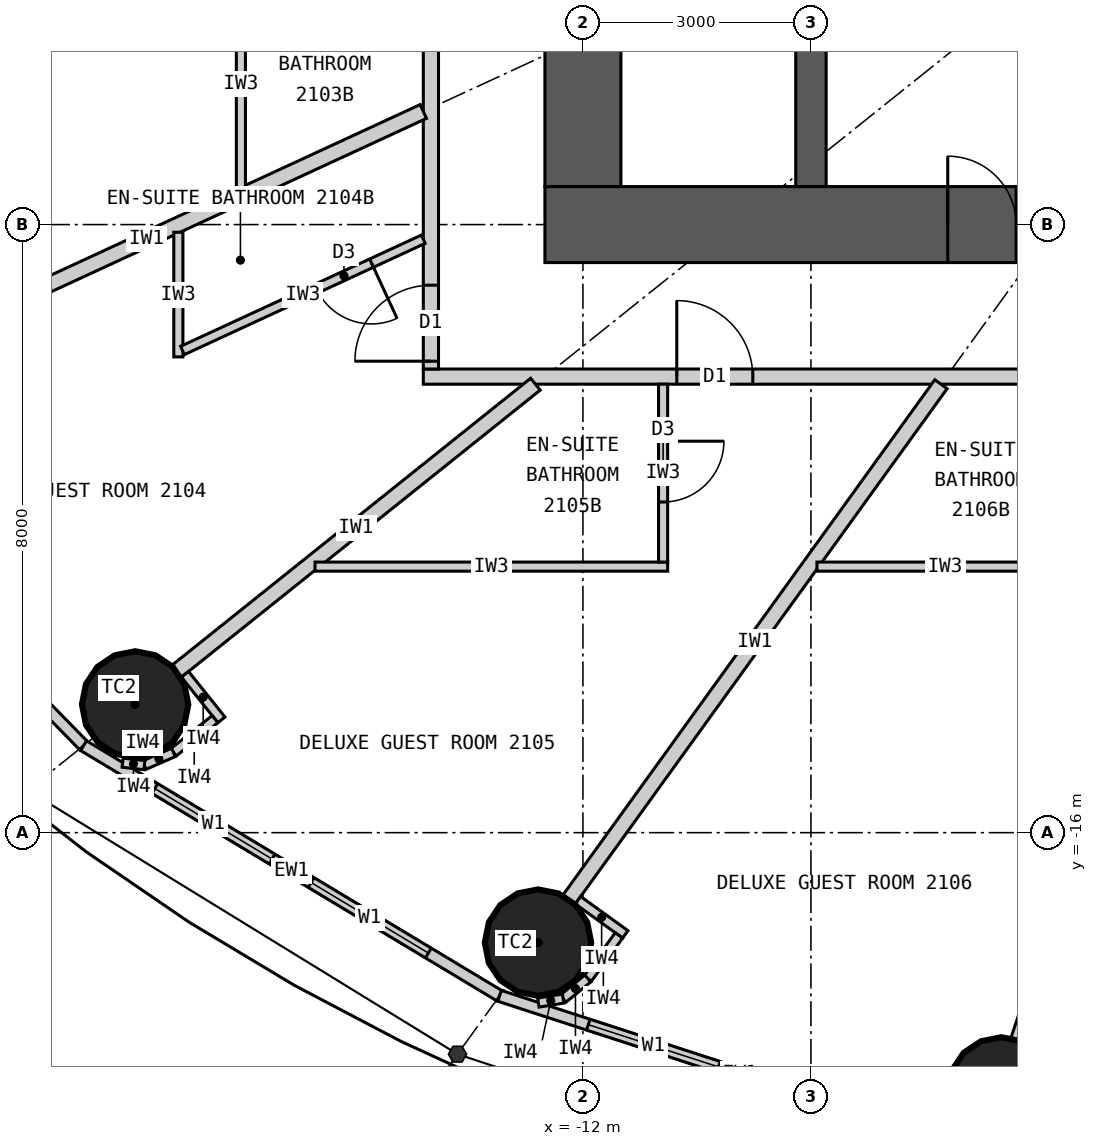
"""IFC4 building model, lengths in metres.
Left out: names, types, materials, properties, quantities, classifications, styles, units other than length and angle.
Written with IfcOpenShell. Run it as: python <this file> out.ifc"""

import sys

from ifc_helpers import new_model, si_unit, direction, frame, frame_2d, origin, origin_2d, place, context, subcontext, project, spatial, rectangle, circle, extrude, element, fill, save


model = new_model("IFC4")
c1 = context("Model", 3, precision=1e-05, world=origin(), true_north=direction((0.0, 1.0)))
c2 = subcontext(c1, "Body", "Model", "MODEL_VIEW")
j1 = project(units=[si_unit("LENGTHUNIT", "METRE"), si_unit("PLANEANGLEUNIT", "RADIAN")], contexts=[c1])
p1 = place(None, origin())
s1 = spatial("IfcSite", under=j1, at=p1, CompositionType="ELEMENT")
p2 = place(p1, origin())
s2 = spatial("IfcBuilding", under=s1, at=p2, CompositionType="ELEMENT")
p3 = place(p2, frame((0.0, 0.0, 83.7)))
s3 = spatial("IfcBuildingStorey", under=s2, at=p3, CompositionType="ELEMENT", Elevation=83.7)
for number, where, z_axis, x_axis in (
    (1, (-17.892, -14.313, 0.0), (0.0, 0.0, 1.0), (1.0, 0.0, 0.0)),
    (2, (-12.591, -17.447, 0.0), (0.0, 0.0, 1.0), (1.0, 0.0, 0.0)),
    (3, (-6.495, -19.391, 0.0), (0.0, 0.0, 1.0), (1.0, 0.0, 0.0)),
):
    element("IfcColumn", number, at=place(p3, frame(where, z_axis=z_axis, x_axis=x_axis)), inside=s3, PredefinedType="COLUMN", context=c2, shape_type="SweptSolid", body=[
        extrude(circle(Radius=0.7, at=origin_2d()), origin(), (0.0, 0.0, 1.0), 3.3),
    ])
p4 = place(p3, frame((12.5, -8.0, 0.0), z_axis=(0.0, 0.0, 1.0), x_axis=(-1.0, 0.0, 0.0)))
e4 = element("IfcWall", 4, at=p4, inside=s3, PredefinedType="SHEAR", context=c2, shape_type="SweptSolid", body=[
    extrude(rectangle(XDim=25.0, YDim=1.0, at=frame_2d((12.5, 0.0))), origin(), (0.0, 0.0, 1.0), 3.3),
])
p5 = place(p4, frame((11.2, 0.0, 0.0)))
e5 = element("IfcOpeningElement", 5, at=p5, cuts=e4, PredefinedType="OPENING", context=c2, shape_type="SweptSolid", body=[
    extrude(rectangle(XDim=1.2, YDim=2.2, at=frame_2d((0.6, 1.1))), frame((0.0, 0.51, 0.0), z_axis=(0.0, -1.0, 0.0), x_axis=(1.0, 0.0, 0.0)), (0.0, 0.0, 1.0), 1.02),
])
p6 = place(p4, frame((18.8, 0.0, 0.0)))
e6 = element("IfcOpeningElement", 6, at=p6, cuts=e4, PredefinedType="OPENING", context=c2, shape_type="SweptSolid", body=[
    extrude(rectangle(XDim=0.9, YDim=2.2, at=frame_2d((0.45, 1.1))), frame((0.0, 0.51, 0.0), z_axis=(0.0, -1.0, 0.0), x_axis=(1.0, 0.0, 0.0)), (0.0, 0.0, 1.0), 1.02),
])
p7 = place(p3, frame((-12.0, 7.5, 0.0), z_axis=(0.0, 0.0, 1.0), x_axis=(0.0, -1.0, 0.0)))
e7 = element("IfcWall", 7, at=p7, inside=s3, PredefinedType="SHEAR", context=c2, shape_type="SweptSolid", body=[
    extrude(rectangle(XDim=15.0, YDim=1.0, at=frame_2d((7.5, 0.0))), origin(), (0.0, 0.0, 1.0), 3.3),
])
p8 = place(p7, frame((6.6, 0.0, 0.0)))
e8 = element("IfcOpeningElement", 8, at=p8, cuts=e7, PredefinedType="OPENING", context=c2, shape_type="SweptSolid", body=[
    extrude(rectangle(XDim=1.8, YDim=2.2, at=frame_2d((0.9, 1.1))), frame((0.0, 0.51, 0.0), z_axis=(0.0, -1.0, 0.0), x_axis=(1.0, 0.0, 0.0)), (0.0, 0.0, 1.0), 1.02),
])
p9 = place(p3, frame((-9.0, -7.5, 0.0), z_axis=(0.0, 0.0, 1.0), x_axis=(0.0, 1.0, 0.0)))
e9 = element("IfcWall", 9, at=p9, inside=s3, PredefinedType="SHEAR", context=c2, shape_type="SweptSolid", body=[
    extrude(rectangle(XDim=3.0, YDim=0.4, at=frame_2d((1.5, 0.0))), origin(), (0.0, 0.0, 1.0), 3.3),
])
p10 = place(p3, frame((-22.803, -10.532, 0.0), z_axis=(0.0, 0.0, 1.0), x_axis=(0.699602905915, -0.714531856557, 0.0)))
e10 = element("IfcWall", 10, at=p10, inside=s3, PredefinedType="ELEMENTEDWALL", context=c2, shape_type="SweptSolid", body=[
    extrude(rectangle(XDim=6.051, YDim=0.15, at=frame_2d((3.025, 0.0))), origin(), (0.0, 0.0, 1.0), 3.12),
])
p11 = place(p10, frame((0.926, 0.0, 0.9)))
e11 = element("IfcOpeningElement", 11, at=p11, cuts=e10, PredefinedType="OPENING", context=c2, shape_type="SweptSolid", body=[
    extrude(rectangle(XDim=1.8, YDim=1.9, at=frame_2d((0.9, 0.95))), frame((0.0, 0.085, 0.0), z_axis=(0.0, -1.0, 0.0), x_axis=(1.0, 0.0, 0.0)), (0.0, 0.0, 1.0), 0.17),
])
p12 = place(p10, frame((3.325, 0.0, 0.9)))
e12 = element("IfcOpeningElement", 12, at=p12, cuts=e10, PredefinedType="OPENING", context=c2, shape_type="SweptSolid", body=[
    extrude(rectangle(XDim=1.8, YDim=1.9, at=frame_2d((0.9, 0.95))), frame((0.0, 0.085, 0.0), z_axis=(0.0, -1.0, 0.0), x_axis=(1.0, 0.0, 0.0)), (0.0, 0.0, 1.0), 0.17),
])
p13 = place(p3, frame((-18.57, -14.856, 0.0), z_axis=(0.0, 0.0, 1.0), x_axis=(0.856983180864, -0.515344377787, 0.0)))
e13 = element("IfcWall", 13, at=p13, inside=s3, PredefinedType="ELEMENTEDWALL", context=c2, shape_type="SweptSolid", body=[
    extrude(rectangle(XDim=6.386, YDim=0.15, at=frame_2d((3.193, 0.0))), origin(), (0.0, 0.0, 1.0), 3.12),
])
p14 = place(p13, frame((1.093, 0.0, 0.9)))
e14 = element("IfcOpeningElement", 14, at=p14, cuts=e13, PredefinedType="OPENING", context=c2, shape_type="SweptSolid", body=[
    extrude(rectangle(XDim=1.8, YDim=1.9, at=frame_2d((0.9, 0.95))), frame((0.0, 0.085, 0.0), z_axis=(0.0, -1.0, 0.0), x_axis=(1.0, 0.0, 0.0)), (0.0, 0.0, 1.0), 0.17),
])
p15 = place(p13, frame((3.493, 0.0, 0.9)))
e15 = element("IfcOpeningElement", 15, at=p15, cuts=e13, PredefinedType="OPENING", context=c2, shape_type="SweptSolid", body=[
    extrude(rectangle(XDim=1.8, YDim=1.9, at=frame_2d((0.9, 0.95))), frame((0.0, 0.085, 0.0), z_axis=(0.0, -1.0, 0.0), x_axis=(1.0, 0.0, 0.0)), (0.0, 0.0, 1.0), 0.17),
])
p16 = place(p3, frame((-13.096, -18.147, 0.0), z_axis=(0.0, 0.0, 1.0), x_axis=(0.951137534625, -0.308767534285, 0.0)))
e16 = element("IfcWall", 16, at=p16, inside=s3, PredefinedType="ELEMENTEDWALL", context=c2, shape_type="SweptSolid", body=[
    extrude(rectangle(XDim=6.655, YDim=0.15, at=frame_2d((3.328, 0.0))), origin(), (0.0, 0.0, 1.0), 3.12),
])
p17 = place(p16, frame((1.228, 0.0, 0.9)))
e17 = element("IfcOpeningElement", 17, at=p17, cuts=e16, PredefinedType="OPENING", context=c2, shape_type="SweptSolid", body=[
    extrude(rectangle(XDim=1.8, YDim=1.9, at=frame_2d((0.9, 0.95))), frame((0.0, 0.085, 0.0), z_axis=(0.0, -1.0, 0.0), x_axis=(1.0, 0.0, 0.0)), (0.0, 0.0, 1.0), 0.17),
])
p18 = place(p16, frame((3.628, 0.0, 0.9)))
e18 = element("IfcOpeningElement", 18, at=p18, cuts=e16, PredefinedType="OPENING", context=c2, shape_type="SweptSolid", body=[
    extrude(rectangle(XDim=1.8, YDim=1.9, at=frame_2d((0.9, 0.95))), frame((0.0, 0.085, 0.0), z_axis=(0.0, -1.0, 0.0), x_axis=(1.0, 0.0, 0.0)), (0.0, 0.0, 1.0), 0.17),
])
p19 = place(p3, frame((14.1, -10.0, 0.0), z_axis=(0.0, 0.0, 1.0), x_axis=(-1.0, 0.0, 0.0)))
e19 = element("IfcWall", 19, at=p19, inside=s3, PredefinedType="PARTITIONING", context=c2, shape_type="SweptSolid", body=[
    extrude(rectangle(XDim=28.2, YDim=0.2, at=frame_2d((14.1, 0.0))), origin(), (0.0, 0.0, 1.0), 3.12),
])
p20 = place(p19, frame((23.865, 0.0, 0.0)))
e20 = element("IfcOpeningElement", 20, at=p20, cuts=e19, PredefinedType="OPENING", context=c2, shape_type="SweptSolid", body=[
    extrude(rectangle(XDim=1.0, YDim=2.2, at=frame_2d((0.5, 1.1))), frame((0.0, 0.11, 0.0), z_axis=(0.0, -1.0, 0.0), x_axis=(1.0, 0.0, 0.0)), (0.0, 0.0, 1.0), 0.22),
])
p21 = place(p19, frame((18.529, 0.0, 0.0)))
e21 = element("IfcOpeningElement", 21, at=p21, cuts=e19, PredefinedType="OPENING", context=c2, shape_type="SweptSolid", body=[
    extrude(rectangle(XDim=1.0, YDim=2.2, at=frame_2d((0.5, 1.1))), frame((0.0, 0.11, 0.0), z_axis=(0.0, -1.0, 0.0), x_axis=(1.0, 0.0, 0.0)), (0.0, 0.0, 1.0), 0.22),
])
p22 = place(p19, frame((14.923, 0.0, 0.0)))
e22 = element("IfcOpeningElement", 22, at=p22, cuts=e19, PredefinedType="OPENING", context=c2, shape_type="SweptSolid", body=[
    extrude(rectangle(XDim=1.0, YDim=2.2, at=frame_2d((0.5, 1.1))), frame((0.0, 0.11, 0.0), z_axis=(0.0, -1.0, 0.0), x_axis=(1.0, 0.0, 0.0)), (0.0, 0.0, 1.0), 0.22),
])
p23 = place(p19, frame((2.801, 0.0, 0.0)))
e23 = element("IfcOpeningElement", 23, at=p23, cuts=e19, PredefinedType="OPENING", context=c2, shape_type="SweptSolid", body=[
    extrude(rectangle(XDim=1.0, YDim=2.2, at=frame_2d((0.5, 1.1))), frame((0.0, 0.11, 0.0), z_axis=(0.0, -1.0, 0.0), x_axis=(1.0, 0.0, 0.0)), (0.0, 0.0, 1.0), 0.22),
])
p24 = place(p3, frame((-14.0, 9.9, 0.0), z_axis=(0.0, 0.0, 1.0), x_axis=(0.0, -1.0, 0.0)))
e24 = element("IfcWall", 24, at=p24, inside=s3, PredefinedType="PARTITIONING", context=c2, shape_type="SweptSolid", body=[
    extrude(rectangle(XDim=19.8, YDim=0.2, at=frame_2d((9.9, 0.0))), origin(), (0.0, 0.0, 1.0), 3.12),
])
p25 = place(p24, frame((7.097, 0.0, 0.0)))
e25 = element("IfcOpeningElement", 25, at=p25, cuts=e24, PredefinedType="OPENING", context=c2, shape_type="SweptSolid", body=[
    extrude(rectangle(XDim=1.0, YDim=2.2, at=frame_2d((0.5, 1.1))), frame((0.0, 0.11, 0.0), z_axis=(0.0, -1.0, 0.0), x_axis=(1.0, 0.0, 0.0)), (0.0, 0.0, 1.0), 0.22),
])
p26 = place(p24, frame((10.778, 0.0, 0.0)))
e26 = element("IfcOpeningElement", 26, at=p26, cuts=e24, PredefinedType="OPENING", context=c2, shape_type="SweptSolid", body=[
    extrude(rectangle(XDim=1.0, YDim=2.2, at=frame_2d((0.5, 1.1))), frame((0.0, 0.11, 0.0), z_axis=(0.0, -1.0, 0.0), x_axis=(1.0, 0.0, 0.0)), (0.0, 0.0, 1.0), 0.22),
])
p27 = place(p24, frame((13.552, 0.0, 0.0)))
e27 = element("IfcOpeningElement", 27, at=p27, cuts=e24, PredefinedType="OPENING", context=c2, shape_type="SweptSolid", body=[
    extrude(rectangle(XDim=1.0, YDim=2.2, at=frame_2d((0.5, 1.1))), frame((0.0, 0.11, 0.0), z_axis=(0.0, -1.0, 0.0), x_axis=(1.0, 0.0, 0.0)), (0.0, 0.0, 1.0), 0.22),
])
p28 = place(p24, frame((18.698, 0.0, 0.0)))
e28 = element("IfcOpeningElement", 28, at=p28, cuts=e24, PredefinedType="OPENING", context=c2, shape_type="SweptSolid", body=[
    extrude(rectangle(XDim=1.0, YDim=2.2, at=frame_2d((0.5, 1.1))), frame((0.0, 0.11, 0.0), z_axis=(0.0, -1.0, 0.0), x_axis=(1.0, 0.0, 0.0)), (0.0, 0.0, 1.0), 0.22),
])
p29 = place(p24, frame((1.877, 0.0, 0.0)))
e29 = element("IfcOpeningElement", 29, at=p29, cuts=e24, PredefinedType="OPENING", context=c2, shape_type="SweptSolid", body=[
    extrude(rectangle(XDim=1.0, YDim=2.2, at=frame_2d((0.5, 1.1))), frame((0.0, 0.11, 0.0), z_axis=(0.0, -1.0, 0.0), x_axis=(1.0, 0.0, 0.0)), (0.0, 0.0, 1.0), 0.22),
])
p30 = place(p3, frame((-14.1, -6.512, 0.0), z_axis=(0.0, 0.0, 1.0), x_axis=(-0.907832871056, -0.419332181247, 0.0)))
e30 = element("IfcWall", 30, at=p30, inside=s3, PredefinedType="PARTITIONING", context=c2, shape_type="SweptSolid", body=[
    extrude(rectangle(XDim=8.023, YDim=0.2, at=frame_2d((4.011, 0.0))), origin(), (0.0, 0.0, 1.0), 2.32),
])
p31 = place(p3, frame((-12.625, -10.1, 0.0), z_axis=(0.0, 0.0, 1.0), x_axis=(-0.780892451574, -0.624665493744, 0.0)))
e31 = element("IfcWall", 31, at=p31, inside=s3, PredefinedType="PARTITIONING", context=c2, shape_type="SweptSolid", body=[
    extrude(rectangle(XDim=6.045, YDim=0.2, at=frame_2d((3.022, 0.0))), origin(), (0.0, 0.0, 1.0), 2.32),
])
p32 = place(p3, frame((-7.289, -10.1, 0.0), z_axis=(0.0, 0.0, 1.0), x_axis=(-0.585198353053, -0.810890182197, 0.0)))
e32 = element("IfcWall", 32, at=p32, inside=s3, PredefinedType="PARTITIONING", context=c2, shape_type="SweptSolid", body=[
    extrude(rectangle(XDim=8.36, YDim=0.2, at=frame_2d((4.18, 0.0))), origin(), (0.0, 0.0, 1.0), 2.32),
])
p33 = place(p3, frame((-3.383, -10.1, 0.0), z_axis=(0.0, 0.0, 1.0), x_axis=(-0.31759592231, -0.948226149256, 0.0)))
e33 = element("IfcWall", 33, at=p33, inside=s3, PredefinedType="PARTITIONING", context=c2, shape_type="SweptSolid", body=[
    extrude(rectangle(XDim=9.098, YDim=0.2, at=frame_2d((4.549, 0.0))), origin(), (0.0, 0.0, 1.0), 2.32),
])
p34 = place(p3, frame((-16.5, -7.521, 0.0), z_axis=(0.0, 0.0, 1.0), x_axis=(0.0, 1.0, 0.0)))
e34 = element("IfcWall", 34, at=p34, inside=s3, PredefinedType="PARTITIONING", context=c2, shape_type="SweptSolid", body=[
    extrude(rectangle(XDim=2.749, YDim=0.12, at=frame_2d((1.374, 0.0))), origin(), (0.0, 0.0, 1.0), 3.12),
])
p35 = place(p3, frame((-17.323, -8.101, 0.0), z_axis=(0.0, 0.0, 1.0), x_axis=(0.0, -1.0, 0.0)))
e35 = element("IfcWall", 35, at=p35, inside=s3, PredefinedType="PARTITIONING", context=c2, shape_type="SweptSolid", body=[
    extrude(rectangle(XDim=1.64, YDim=0.12, at=frame_2d((0.82, 0.0))), origin(), (0.0, 0.0, 1.0), 3.12),
])
p36 = place(p3, frame((-14.1, -8.193, 0.0), z_axis=(0.0, 0.0, 1.0), x_axis=(-0.907836493557, -0.419324338628, 0.0)))
e36 = element("IfcWall", 36, at=p36, inside=s3, PredefinedType="PARTITIONING", context=c2, shape_type="SweptSolid", body=[
    extrude(rectangle(XDim=3.49, YDim=0.12, at=frame_2d((1.745, 0.0))), origin(), (0.0, 0.0, 1.0), 3.12),
])
p37 = place(p36, frame((0.75, 0.0, 0.0)))
e37 = element("IfcOpeningElement", 37, at=p37, cuts=e36, PredefinedType="OPENING", context=c2, shape_type="SweptSolid", body=[
    extrude(rectangle(XDim=0.8, YDim=2.1, at=frame_2d((0.4, 1.05))), frame((0.0, 0.07, 0.0), z_axis=(0.0, -1.0, 0.0), x_axis=(1.0, 0.0, 0.0)), (0.0, 0.0, 1.0), 0.14),
])
p38 = place(p3, frame((-15.525, -12.5, 0.0), z_axis=(0.0, 0.0, 1.0), x_axis=(1.0, 0.0, 0.0)))
e38 = element("IfcWall", 38, at=p38, inside=s3, PredefinedType="PARTITIONING", context=c2, shape_type="SweptSolid", body=[
    extrude(rectangle(XDim=4.64, YDim=0.12, at=frame_2d((2.32, 0.0))), origin(), (0.0, 0.0, 1.0), 3.12),
])
p39 = place(p3, frame((-10.945, -10.1, 0.0), z_axis=(0.0, 0.0, 1.0), x_axis=(0.0, -1.0, 0.0)))
e39 = element("IfcWall", 39, at=p39, inside=s3, PredefinedType="PARTITIONING", context=c2, shape_type="SweptSolid", body=[
    extrude(rectangle(XDim=2.34, YDim=0.12, at=frame_2d((1.17, 0.0))), origin(), (0.0, 0.0, 1.0), 3.12),
])
p40 = place(p39, frame((0.75, 0.0, 0.0)))
e40 = element("IfcOpeningElement", 40, at=p40, cuts=e39, PredefinedType="OPENING", context=c2, shape_type="SweptSolid", body=[
    extrude(rectangle(XDim=0.8, YDim=2.1, at=frame_2d((0.4, 1.05))), frame((0.0, 0.07, 0.0), z_axis=(0.0, -1.0, 0.0), x_axis=(1.0, 0.0, 0.0)), (0.0, 0.0, 1.0), 0.14),
])
p41 = place(p3, frame((-8.921, -12.5, 0.0), z_axis=(0.0, 0.0, 1.0), x_axis=(1.0, 0.0, 0.0)))
e41 = element("IfcWall", 41, at=p41, inside=s3, PredefinedType="PARTITIONING", context=c2, shape_type="SweptSolid", body=[
    extrude(rectangle(XDim=3.372, YDim=0.12, at=frame_2d((1.686, 0.0))), origin(), (0.0, 0.0, 1.0), 3.12),
])
p42 = place(p3, frame((-17.236, -13.917, 0.0), z_axis=(0.0, 0.0, 1.0), x_axis=(0.624695047554, -0.780868809443, 0.0)))
e42 = element("IfcWall", 42, at=p42, inside=s3, PredefinedType="PARTITIONING", context=c2, shape_type="SweptSolid", body=[
    extrude(rectangle(XDim=0.768, YDim=0.12, at=frame_2d((0.384, 0.0))), origin(), (0.0, 0.0, 1.0), 3.12),
])
p43 = place(p3, frame((-16.841, -14.507, 0.0), z_axis=(0.0, 0.0, 1.0), x_axis=(-0.780902834923, -0.62465251333, 0.0)))
e43 = element("IfcWall", 43, at=p43, inside=s3, PredefinedType="PARTITIONING", context=c2, shape_type="SweptSolid", body=[
    extrude(rectangle(XDim=0.7, YDim=0.12, at=frame_2d((0.35, 0.0))), origin(), (0.0, 0.0, 1.0), 3.12),
])
p44 = place(p3, frame((-17.387, -14.944, 0.0), z_axis=(0.0, 0.0, 1.0), x_axis=(-0.916036698064, -0.401094462441, 0.0)))
e44 = element("IfcWall", 44, at=p44, inside=s3, PredefinedType="PARTITIONING", context=c2, shape_type="SweptSolid", body=[
    extrude(rectangle(XDim=0.418, YDim=0.12, at=frame_2d((0.209, 0.0))), origin(), (0.0, 0.0, 1.0), 3.12),
])
p45 = place(p3, frame((-17.77, -15.112, 0.0), z_axis=(0.0, 0.0, 1.0), x_axis=(-0.993904401174, 0.110245368731, 0.0)))
e45 = element("IfcWall", 45, at=p45, inside=s3, PredefinedType="PARTITIONING", context=c2, shape_type="SweptSolid", body=[
    extrude(rectangle(XDim=0.288, YDim=0.12, at=frame_2d((0.144, 0.0))), origin(), (0.0, 0.0, 1.0), 3.12),
])
p46 = place(p3, frame((-12.065, -16.889, 0.0), z_axis=(0.0, 0.0, 1.0), x_axis=(0.810821798253, -0.585293098778, 0.0)))
e46 = element("IfcWall", 46, at=p46, inside=s3, PredefinedType="PARTITIONING", context=c2, shape_type="SweptSolid", body=[
    extrude(rectangle(XDim=0.768, YDim=0.12, at=frame_2d((0.384, 0.0))), origin(), (0.0, 0.0, 1.0), 3.12),
])
p47 = place(p3, frame((-11.526, -17.351, 0.0), z_axis=(0.0, 0.0, 1.0), x_axis=(-0.585223113993, -0.810872312296, 0.0)))
e47 = element("IfcWall", 47, at=p47, inside=s3, PredefinedType="PARTITIONING", context=c2, shape_type="SweptSolid", body=[
    extrude(rectangle(XDim=0.7, YDim=0.12, at=frame_2d((0.35, 0.0))), origin(), (0.0, 0.0, 1.0), 3.12),
])
p48 = place(p3, frame((-11.936, -17.919, 0.0), z_axis=(0.0, 0.0, 1.0), x_axis=(-0.775023088441, -0.631932917629, 0.0)))
e48 = element("IfcWall", 48, at=p48, inside=s3, PredefinedType="PARTITIONING", context=c2, shape_type="SweptSolid", body=[
    extrude(rectangle(XDim=0.418, YDim=0.12, at=frame_2d((0.209, 0.0))), origin(), (0.0, 0.0, 1.0), 3.12),
])
p49 = place(p3, frame((-12.26, -18.183, 0.0), z_axis=(0.0, 0.0, 1.0), x_axis=(-0.987218661664, -0.159371622511, 0.0)))
e49 = element("IfcWall", 49, at=p49, inside=s3, PredefinedType="PARTITIONING", context=c2, shape_type="SweptSolid", body=[
    extrude(rectangle(XDim=0.331, YDim=0.12, at=frame_2d((0.166, 0.0))), origin(), (0.0, 0.0, 1.0), 3.12),
])
p50 = place(p14, origin())
e50 = element("IfcWindow", 50, at=p50, inside=s3, PartitioningType="SINGLE_PANEL", PredefinedType="WINDOW", context=c2, shape_type="SweptSolid", body=[
    extrude(rectangle(XDim=1.8, YDim=1.9, at=frame_2d((0.9, 0.95))), frame((0.0, 0.03, 0.0), z_axis=(0.0, -1.0, 0.0), x_axis=(1.0, 0.0, 0.0)), (0.0, 0.0, 1.0), 0.06),
])
fill(e14, e50)
p51 = place(p15, origin())
e51 = element("IfcWindow", 51, at=p51, inside=s3, PartitioningType="SINGLE_PANEL", PredefinedType="WINDOW", context=c2, shape_type="SweptSolid", body=[
    extrude(rectangle(XDim=1.8, YDim=1.9, at=frame_2d((0.9, 0.95))), frame((0.0, 0.03, 0.0), z_axis=(0.0, -1.0, 0.0), x_axis=(1.0, 0.0, 0.0)), (0.0, 0.0, 1.0), 0.06),
])
fill(e15, e51)
p52 = place(p17, origin())
e52 = element("IfcWindow", 52, at=p52, inside=s3, PartitioningType="SINGLE_PANEL", PredefinedType="WINDOW", context=c2, shape_type="SweptSolid", body=[
    extrude(rectangle(XDim=1.8, YDim=1.9, at=frame_2d((0.9, 0.95))), frame((0.0, 0.03, 0.0), z_axis=(0.0, -1.0, 0.0), x_axis=(1.0, 0.0, 0.0)), (0.0, 0.0, 1.0), 0.06),
])
fill(e17, e52)
p53 = place(p37, origin())
e53 = element("IfcDoor", 53, at=p53, inside=s3, OperationType="SINGLE_SWING_LEFT", PredefinedType="DOOR", context=c2, shape_type="SweptSolid", body=[
    extrude(rectangle(XDim=0.8, YDim=2.1, at=frame_2d((0.4, 1.05))), frame((0.0, 0.025, 0.0), z_axis=(0.0, -1.0, 0.0), x_axis=(1.0, 0.0, 0.0)), (0.0, 0.0, 1.0), 0.05),
])
fill(e37, e53)
p54 = place(p28, origin())
e54 = element("IfcDoor", 54, at=p54, inside=s3, OperationType="SINGLE_SWING_RIGHT", PredefinedType="DOOR", context=c2, shape_type="SweptSolid", body=[
    extrude(rectangle(XDim=1.0, YDim=2.2, at=frame_2d((0.5, 1.1))), frame((0.0, 0.025, 0.0), z_axis=(0.0, -1.0, 0.0), x_axis=(1.0, 0.0, 0.0)), (0.0, 0.0, 1.0), 0.05),
])
fill(e28, e54)
p55 = place(p40, origin())
e55 = element("IfcDoor", 55, at=p55, inside=s3, OperationType="SINGLE_SWING_LEFT", PredefinedType="DOOR", context=c2, shape_type="SweptSolid", body=[
    extrude(rectangle(XDim=0.8, YDim=2.1, at=frame_2d((0.4, 1.05))), frame((0.0, 0.025, 0.0), z_axis=(0.0, -1.0, 0.0), x_axis=(1.0, 0.0, 0.0)), (0.0, 0.0, 1.0), 0.05),
])
fill(e40, e55)
p56 = place(p20, origin())
e56 = element("IfcDoor", 56, at=p56, inside=s3, OperationType="SINGLE_SWING_RIGHT", PredefinedType="DOOR", context=c2, shape_type="SweptSolid", body=[
    extrude(rectangle(XDim=1.0, YDim=2.2, at=frame_2d((0.5, 1.1))), frame((0.0, 0.025, 0.0), z_axis=(0.0, -1.0, 0.0), x_axis=(1.0, 0.0, 0.0)), (0.0, 0.0, 1.0), 0.05),
])
fill(e20, e56)
p57 = place(p6, origin())
e57 = element("IfcDoor", 57, at=p57, inside=s3, OperationType="SINGLE_SWING_RIGHT", PredefinedType="DOOR", context=c2, shape_type="SweptSolid", body=[
    extrude(rectangle(XDim=0.9, YDim=2.2, at=frame_2d((0.45, 1.1))), frame((0.0, 0.025, 0.0), z_axis=(0.0, -1.0, 0.0), x_axis=(1.0, 0.0, 0.0)), (0.0, 0.0, 1.0), 0.05),
])
fill(e6, e57)
save(model, sys.argv[1])
